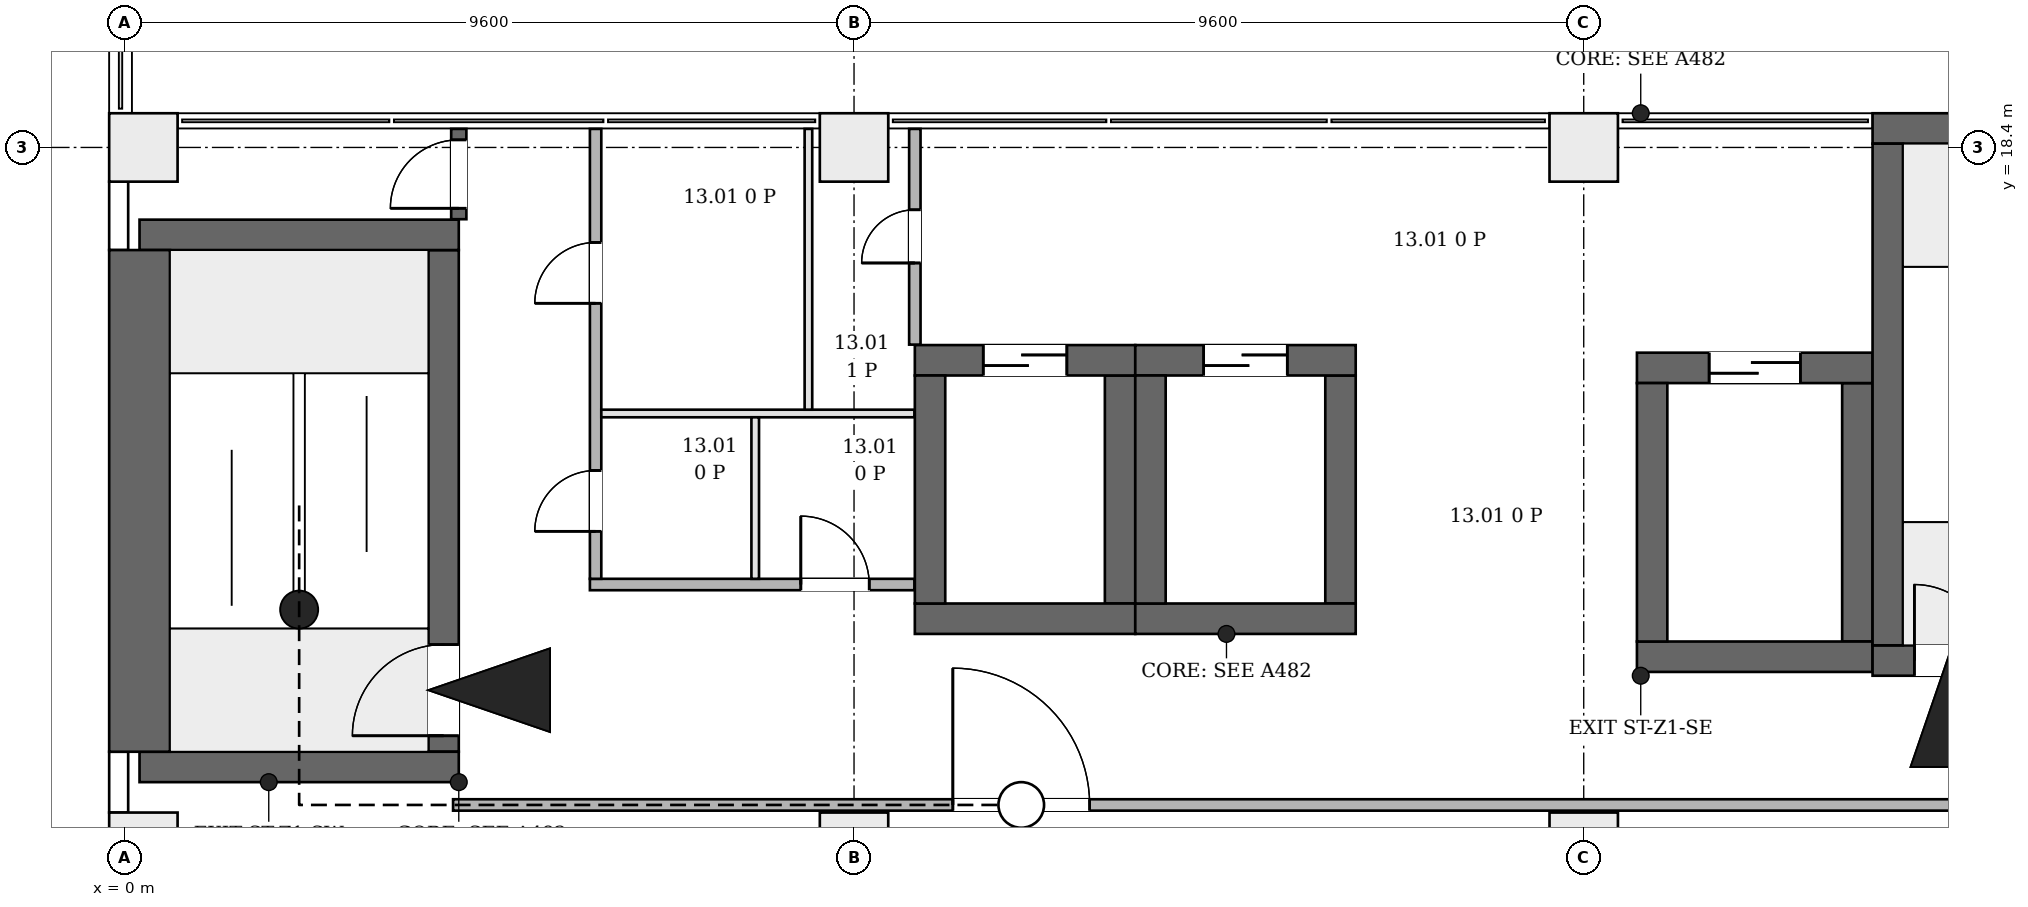
"""IFC4 building model, lengths in metres.
Left out: names, types, materials, properties, quantities, classifications, styles, units other than length and angle.
Written with IfcOpenShell. Run it as: python <this file> out.ifc"""

import sys

from ifc_helpers import new_model, si_unit, direction, frame, frame_2d, origin, origin_2d, place, context, subcontext, project, spatial, rectangle, extrude, element, fill, save


model = new_model("IFC4")
c1 = context("Model", 3, precision=1e-05, world=origin(), true_north=direction((0.0, 1.0)))
c2 = subcontext(c1, "Body", "Model", "MODEL_VIEW")
j1 = project(units=[si_unit("LENGTHUNIT", "METRE"), si_unit("PLANEANGLEUNIT", "RADIAN")], contexts=[c1])
p1 = place(None, origin())
s1 = spatial("IfcSite", under=j1, at=p1, CompositionType="ELEMENT")
p2 = place(p1, origin())
s2 = spatial("IfcBuilding", under=s1, at=p2, CompositionType="ELEMENT")
p3 = place(p2, frame((0.0, 0.0, 65.5)))
s3 = spatial("IfcBuildingStorey", under=s2, at=p3, CompositionType="ELEMENT", Elevation=65.5)
for number, where, z_axis, x_axis in (
    (1, (0.2, 10.25, 0.0), (0.0, 0.0, 1.0), (1.0, 0.0, 0.0)),
    (2, (0.2, 17.25, 0.0), (0.0, 0.0, 1.0), (1.0, 0.0, 0.0)),
):
    element("IfcWall", number, at=place(p3, frame(where, z_axis=z_axis, x_axis=x_axis)), inside=s3, PredefinedType="SHEAR", context=c2, shape_type="SweptSolid", body=[
        extrude(rectangle(XDim=4.2, YDim=0.4, at=frame_2d((2.1, 0.0))), origin(), (0.0, 0.0, 1.0), 4.2),
    ])
p4 = place(p3, frame((0.2, 10.45, 0.0), z_axis=(0.0, 0.0, 1.0), x_axis=(0.0, 1.0, 0.0)))
e3 = element("IfcWall", 3, at=p4, inside=s3, PredefinedType="SHEAR", context=c2, shape_type="SweptSolid", body=[
    extrude(rectangle(XDim=6.6, YDim=0.8, at=frame_2d((3.3, 0.0))), origin(), (0.0, 0.0, 1.0), 4.2),
])
p5 = place(p3, frame((4.2, 10.45, 0.0), z_axis=(0.0, 0.0, 1.0), x_axis=(0.0, 1.0, 0.0)))
e4 = element("IfcWall", 4, at=p5, inside=s3, PredefinedType="SHEAR", context=c2, shape_type="SweptSolid", body=[
    extrude(rectangle(XDim=6.6, YDim=0.4, at=frame_2d((3.3, 0.0))), origin(), (0.0, 0.0, 1.0), 4.2),
])
p6 = place(p5, frame((0.21, 0.0, 0.0)))
e5 = element("IfcOpeningElement", 5, at=p6, cuts=e4, PredefinedType="OPENING", context=c2, shape_type="SweptSolid", body=[
    extrude(rectangle(XDim=1.2, YDim=2.1, at=frame_2d((0.6, 1.05))), frame((0.0, 0.21, 0.0), z_axis=(0.0, -1.0, 0.0), x_axis=(1.0, 0.0, 0.0)), (0.0, 0.0, 1.0), 0.42),
])
p7 = place(p3, frame((23.0, 11.65, 0.0), z_axis=(0.0, 0.0, 1.0), x_axis=(1.0, 0.0, 0.0)))
e6 = element("IfcWall", 6, at=p7, inside=s3, PredefinedType="SHEAR", context=c2, shape_type="SweptSolid", body=[
    extrude(rectangle(XDim=4.2, YDim=0.4, at=frame_2d((2.1, 0.0))), origin(), (0.0, 0.0, 1.0), 4.2),
])
p8 = place(p7, frame((0.55, 0.0, 0.0)))
e7 = element("IfcOpeningElement", 7, at=p8, cuts=e6, PredefinedType="OPENING", context=c2, shape_type="SweptSolid", body=[
    extrude(rectangle(XDim=1.0, YDim=2.1, at=frame_2d((0.5, 1.05))), frame((0.0, 0.21, 0.0), z_axis=(0.0, -1.0, 0.0), x_axis=(1.0, 0.0, 0.0)), (0.0, 0.0, 1.0), 0.42),
])
p9 = place(p7, frame((2.65, 0.0, 0.0)))
e8 = element("IfcOpeningElement", 8, at=p9, cuts=e6, PredefinedType="OPENING", context=c2, shape_type="SweptSolid", body=[
    extrude(rectangle(XDim=1.0, YDim=2.1, at=frame_2d((0.5, 1.05))), frame((0.0, 0.21, 0.0), z_axis=(0.0, -1.0, 0.0), x_axis=(1.0, 0.0, 0.0)), (0.0, 0.0, 1.0), 0.42),
])
p10 = place(p3, frame((23.0, 18.65, 0.0), z_axis=(0.0, 0.0, 1.0), x_axis=(1.0, 0.0, 0.0)))
e9 = element("IfcWall", 9, at=p10, inside=s3, PredefinedType="SHEAR", context=c2, shape_type="SweptSolid", body=[
    extrude(rectangle(XDim=4.2, YDim=0.4, at=frame_2d((2.1, 0.0))), origin(), (0.0, 0.0, 1.0), 4.2),
])
p11 = place(p3, frame((23.2, 11.85, 0.0), z_axis=(0.0, 0.0, 1.0), x_axis=(0.0, 1.0, 0.0)))
e10 = element("IfcWall", 10, at=p11, inside=s3, PredefinedType="SHEAR", context=c2, shape_type="SweptSolid", body=[
    extrude(rectangle(XDim=6.6, YDim=0.4, at=frame_2d((3.3, 0.0))), origin(), (0.0, 0.0, 1.0), 4.2),
])
p12 = place(p3, frame((10.4, 12.2, 0.0), z_axis=(0.0, 0.0, 1.0), x_axis=(1.0, 0.0, 0.0)))
e11 = element("IfcWall", 11, at=p12, inside=s3, PredefinedType="SHEAR", context=c2, shape_type="SweptSolid", body=[
    extrude(rectangle(XDim=2.9, YDim=0.4, at=frame_2d((1.45, 0.0))), origin(), (0.0, 0.0, 1.0), 4.2),
])
p13 = place(p3, frame((10.4, 15.6, 0.0), z_axis=(0.0, 0.0, 1.0), x_axis=(1.0, 0.0, 0.0)))
e12 = element("IfcWall", 12, at=p13, inside=s3, PredefinedType="SHEAR", context=c2, shape_type="SweptSolid", body=[
    extrude(rectangle(XDim=2.9, YDim=0.4, at=frame_2d((1.45, 0.0))), origin(), (0.0, 0.0, 1.0), 4.2),
])
p14 = place(p13, frame((0.9, 0.0, 0.0)))
e13 = element("IfcOpeningElement", 13, at=p14, cuts=e12, PredefinedType="OPENING", context=c2, shape_type="SweptSolid", body=[
    extrude(rectangle(XDim=1.1, YDim=2.1, at=frame_2d((0.55, 1.05))), frame((0.0, 0.21, 0.0), z_axis=(0.0, -1.0, 0.0), x_axis=(1.0, 0.0, 0.0)), (0.0, 0.0, 1.0), 0.42),
])
for number, where, z_axis, x_axis in (
    (14, (10.6, 12.4, 0.0), (0.0, 0.0, 1.0), (0.0, 1.0, 0.0)),
    (15, (13.1, 12.4, 0.0), (0.0, 0.0, 1.0), (0.0, 1.0, 0.0)),
):
    element("IfcWall", number, at=place(p3, frame(where, z_axis=z_axis, x_axis=x_axis)), inside=s3, PredefinedType="SHEAR", context=c2, shape_type="SweptSolid", body=[
        extrude(rectangle(XDim=3.0, YDim=0.4, at=frame_2d((1.5, 0.0))), origin(), (0.0, 0.0, 1.0), 4.2),
    ])
p15 = place(p3, frame((13.3, 12.2, 0.0), z_axis=(0.0, 0.0, 1.0), x_axis=(1.0, 0.0, 0.0)))
e16 = element("IfcWall", 16, at=p15, inside=s3, PredefinedType="SHEAR", context=c2, shape_type="SweptSolid", body=[
    extrude(rectangle(XDim=2.9, YDim=0.4, at=frame_2d((1.45, 0.0))), origin(), (0.0, 0.0, 1.0), 4.2),
])
p16 = place(p3, frame((13.3, 15.6, 0.0), z_axis=(0.0, 0.0, 1.0), x_axis=(1.0, 0.0, 0.0)))
e17 = element("IfcWall", 17, at=p16, inside=s3, PredefinedType="SHEAR", context=c2, shape_type="SweptSolid", body=[
    extrude(rectangle(XDim=2.9, YDim=0.4, at=frame_2d((1.45, 0.0))), origin(), (0.0, 0.0, 1.0), 4.2),
])
p17 = place(p16, frame((0.9, 0.0, 0.0)))
e18 = element("IfcOpeningElement", 18, at=p17, cuts=e17, PredefinedType="OPENING", context=c2, shape_type="SweptSolid", body=[
    extrude(rectangle(XDim=1.1, YDim=2.1, at=frame_2d((0.55, 1.05))), frame((0.0, 0.21, 0.0), z_axis=(0.0, -1.0, 0.0), x_axis=(1.0, 0.0, 0.0)), (0.0, 0.0, 1.0), 0.42),
])
for number, where, z_axis, x_axis in (
    (19, (13.5, 12.4, 0.0), (0.0, 0.0, 1.0), (0.0, 1.0, 0.0)),
    (20, (16.0, 12.4, 0.0), (0.0, 0.0, 1.0), (0.0, 1.0, 0.0)),
):
    element("IfcWall", number, at=place(p3, frame(where, z_axis=z_axis, x_axis=x_axis)), inside=s3, PredefinedType="SHEAR", context=c2, shape_type="SweptSolid", body=[
        extrude(rectangle(XDim=3.0, YDim=0.4, at=frame_2d((1.5, 0.0))), origin(), (0.0, 0.0, 1.0), 4.2),
    ])
p18 = place(p3, frame((19.9, 11.7, 0.0), z_axis=(0.0, 0.0, 1.0), x_axis=(1.0, 0.0, 0.0)))
e21 = element("IfcWall", 21, at=p18, inside=s3, PredefinedType="SHEAR", context=c2, shape_type="SweptSolid", body=[
    extrude(rectangle(XDim=3.1, YDim=0.4, at=frame_2d((1.55, 0.0))), origin(), (0.0, 0.0, 1.0), 4.2),
])
p19 = place(p3, frame((19.9, 15.5, 0.0), z_axis=(0.0, 0.0, 1.0), x_axis=(1.0, 0.0, 0.0)))
e22 = element("IfcWall", 22, at=p19, inside=s3, PredefinedType="SHEAR", context=c2, shape_type="SweptSolid", body=[
    extrude(rectangle(XDim=3.1, YDim=0.4, at=frame_2d((1.55, 0.0))), origin(), (0.0, 0.0, 1.0), 4.2),
])
p20 = place(p19, frame((0.95, 0.0, 0.0)))
e23 = element("IfcOpeningElement", 23, at=p20, cuts=e22, PredefinedType="OPENING", context=c2, shape_type="SweptSolid", body=[
    extrude(rectangle(XDim=1.2, YDim=2.1, at=frame_2d((0.6, 1.05))), frame((0.0, 0.21, 0.0), z_axis=(0.0, -1.0, 0.0), x_axis=(1.0, 0.0, 0.0)), (0.0, 0.0, 1.0), 0.42),
])
for number, where, z_axis, x_axis in (
    (24, (20.1, 11.9, 0.0), (0.0, 0.0, 1.0), (0.0, 1.0, 0.0)),
    (25, (22.8, 11.9, 0.0), (0.0, 0.0, 1.0), (0.0, 1.0, 0.0)),
):
    element("IfcWall", number, at=place(p3, frame(where, z_axis=z_axis, x_axis=x_axis)), inside=s3, PredefinedType="SHEAR", context=c2, shape_type="SweptSolid", body=[
        extrude(rectangle(XDim=3.4, YDim=0.4, at=frame_2d((1.7, 0.0))), origin(), (0.0, 0.0, 1.0), 4.2),
    ])
for number, where, z_axis, x_axis in (
    (26, (0.25, 9.2, 0.0), (0.0, 0.0, 1.0), (1.0, 0.0, 0.0)),
    (27, (9.6, 9.2, 0.0), (0.0, 0.0, 1.0), (1.0, 0.0, 0.0)),
    (28, (19.2, 9.2, 0.0), (0.0, 0.0, 1.0), (1.0, 0.0, 0.0)),
    (29, (0.25, 18.4, 0.0), (0.0, 0.0, 1.0), (1.0, 0.0, 0.0)),
    (30, (9.6, 18.4, 0.0), (0.0, 0.0, 1.0), (1.0, 0.0, 0.0)),
    (31, (19.2, 18.4, 0.0), (0.0, 0.0, 1.0), (1.0, 0.0, 0.0)),
):
    element("IfcColumn", number, at=place(p3, frame(where, z_axis=z_axis, x_axis=x_axis)), inside=s3, PredefinedType="COLUMN", context=c2, shape_type="SweptSolid", body=[
        extrude(rectangle(XDim=0.9, YDim=0.9, at=origin_2d()), origin(), (0.0, 0.0, 1.0), 4.2),
    ])
p21 = place(p3, frame((-0.074, 10.45, 0.0), z_axis=(0.0, 0.0, 1.0), x_axis=(0.0, -1.0, 0.0)))
e32 = element("IfcWall", 32, at=p21, inside=s3, PredefinedType="ELEMENTEDWALL", context=c2, shape_type="SweptSolid", body=[
    extrude(rectangle(XDim=0.8, YDim=0.25, at=frame_2d((0.4, 0.0))), origin(), (0.0, 0.0, 1.0), 3.9),
])
p22 = place(p3, frame((-0.074, 17.95, 0.0), z_axis=(0.0, 0.0, 1.0), x_axis=(0.0, -1.0, 0.0)))
e33 = element("IfcWall", 33, at=p22, inside=s3, PredefinedType="ELEMENTEDWALL", context=c2, shape_type="SweptSolid", body=[
    extrude(rectangle(XDim=0.9, YDim=0.25, at=frame_2d((0.45, 0.0))), origin(), (0.0, 0.0, 1.0), 3.9),
])
p23 = place(p3, frame((4.4, 17.456, 0.0), z_axis=(0.0, 0.0, 1.0), x_axis=(0.0, 1.0, 0.0)))
e34 = element("IfcWall", 34, at=p23, inside=s3, PredefinedType="PARTITIONING", context=c2, shape_type="SweptSolid", body=[
    extrude(rectangle(XDim=1.188, YDim=0.2, at=frame_2d((0.594, 0.0))), origin(), (0.0, 0.0, 1.0), 3.9),
])
p24 = place(p23, frame((0.144, 0.0, 0.0)))
e35 = element("IfcOpeningElement", 35, at=p24, cuts=e34, PredefinedType="OPENING", context=c2, shape_type="SweptSolid", body=[
    extrude(rectangle(XDim=0.9, YDim=2.1, at=frame_2d((0.45, 1.05))), frame((0.0, 0.11, 0.0), z_axis=(0.0, -1.0, 0.0), x_axis=(1.0, 0.0, 0.0)), (0.0, 0.0, 1.0), 0.22),
])
p25 = place(p3, frame((4.325, 9.75, 0.0), z_axis=(0.0, 0.0, 1.0), x_axis=(1.0, 0.0, 0.0)))
e36 = element("IfcWall", 36, at=p25, inside=s3, PredefinedType="PARTITIONING", context=c2, shape_type="SweptSolid", body=[
    extrude(rectangle(XDim=43.869, YDim=0.15, at=frame_2d((21.935, 0.0))), origin(), (0.0, 0.0, 1.0), 3.9),
])
p26 = place(p25, frame((6.575, 0.0, 0.0)))
e37 = element("IfcOpeningElement", 37, at=p26, cuts=e36, PredefinedType="OPENING", context=c2, shape_type="SweptSolid", body=[
    extrude(rectangle(XDim=1.8, YDim=2.1, at=frame_2d((0.9, 1.05))), frame((0.0, 0.085, 0.0), z_axis=(0.0, -1.0, 0.0), x_axis=(1.0, 0.0, 0.0)), (0.0, 0.0, 1.0), 0.17),
])
p27 = place(p25, frame((21.175, 0.0, 0.0)))
e38 = element("IfcOpeningElement", 38, at=p27, cuts=e36, PredefinedType="OPENING", context=c2, shape_type="SweptSolid", body=[
    extrude(rectangle(XDim=1.8, YDim=2.1, at=frame_2d((0.9, 1.05))), frame((0.0, 0.085, 0.0), z_axis=(0.0, -1.0, 0.0), x_axis=(1.0, 0.0, 0.0)), (0.0, 0.0, 1.0), 0.17),
])
p28 = place(p25, frame((36.075, 0.0, 0.0)))
e39 = element("IfcOpeningElement", 39, at=p28, cuts=e36, PredefinedType="OPENING", context=c2, shape_type="SweptSolid", body=[
    extrude(rectangle(XDim=1.0, YDim=2.1, at=frame_2d((0.5, 1.05))), frame((0.0, 0.085, 0.0), z_axis=(0.0, -1.0, 0.0), x_axis=(1.0, 0.0, 0.0)), (0.0, 0.0, 1.0), 0.17),
])
p29 = place(p3, frame((6.125, 12.65, 0.0), z_axis=(0.0, 0.0, 1.0), x_axis=(1.0, 0.0, 0.0)))
e40 = element("IfcWall", 40, at=p29, inside=s3, PredefinedType="PARTITIONING", context=c2, shape_type="SweptSolid", body=[
    extrude(rectangle(XDim=4.269, YDim=0.15, at=frame_2d((2.135, 0.0))), origin(), (0.0, 0.0, 1.0), 3.9),
])
p30 = place(p29, frame((2.775, 0.0, 0.0)))
e41 = element("IfcOpeningElement", 41, at=p30, cuts=e40, PredefinedType="OPENING", context=c2, shape_type="SweptSolid", body=[
    extrude(rectangle(XDim=0.9, YDim=2.1, at=frame_2d((0.45, 1.05))), frame((0.0, 0.085, 0.0), z_axis=(0.0, -1.0, 0.0), x_axis=(1.0, 0.0, 0.0)), (0.0, 0.0, 1.0), 0.17),
])
p31 = place(p3, frame((6.2, 12.725, 0.0), z_axis=(0.0, 0.0, 1.0), x_axis=(0.0, 1.0, 0.0)))
e42 = element("IfcWall", 42, at=p31, inside=s3, PredefinedType="PARTITIONING", context=c2, shape_type="SweptSolid", body=[
    extrude(rectangle(XDim=5.919, YDim=0.15, at=frame_2d((2.959, 0.0))), origin(), (0.0, 0.0, 1.0), 3.9),
])
p32 = place(p31, frame((0.625, 0.0, 0.0)))
e43 = element("IfcOpeningElement", 43, at=p32, cuts=e42, PredefinedType="OPENING", context=c2, shape_type="SweptSolid", body=[
    extrude(rectangle(XDim=0.8, YDim=2.1, at=frame_2d((0.4, 1.05))), frame((0.0, 0.085, 0.0), z_axis=(0.0, -1.0, 0.0), x_axis=(1.0, 0.0, 0.0)), (0.0, 0.0, 1.0), 0.17),
])
p33 = place(p31, frame((3.625, 0.0, 0.0)))
e44 = element("IfcOpeningElement", 44, at=p33, cuts=e42, PredefinedType="OPENING", context=c2, shape_type="SweptSolid", body=[
    extrude(rectangle(XDim=0.8, YDim=2.1, at=frame_2d((0.4, 1.05))), frame((0.0, 0.085, 0.0), z_axis=(0.0, -1.0, 0.0), x_axis=(1.0, 0.0, 0.0)), (0.0, 0.0, 1.0), 0.17),
])
p34 = place(p3, frame((6.275, 14.9, 0.0), z_axis=(0.0, 0.0, 1.0), x_axis=(1.0, 0.0, 0.0)))
e45 = element("IfcWall", 45, at=p34, inside=s3, PredefinedType="PARTITIONING", context=c2, shape_type="SweptSolid", body=[
    extrude(rectangle(XDim=4.119, YDim=0.1, at=frame_2d((2.06, 0.0))), origin(), (0.0, 0.0, 1.0), 3.9),
])
p35 = place(p3, frame((8.3, 12.725, 0.0), z_axis=(0.0, 0.0, 1.0), x_axis=(0.0, 1.0, 0.0)))
e46 = element("IfcWall", 46, at=p35, inside=s3, PredefinedType="PARTITIONING", context=c2, shape_type="SweptSolid", body=[
    extrude(rectangle(XDim=2.125, YDim=0.1, at=frame_2d((1.062, 0.0))), origin(), (0.0, 0.0, 1.0), 3.9),
])
p36 = place(p3, frame((9.0, 14.95, 0.0), z_axis=(0.0, 0.0, 1.0), x_axis=(0.0, 1.0, 0.0)))
e47 = element("IfcWall", 47, at=p36, inside=s3, PredefinedType="PARTITIONING", context=c2, shape_type="SweptSolid", body=[
    extrude(rectangle(XDim=3.694, YDim=0.1, at=frame_2d((1.847, 0.0))), origin(), (0.0, 0.0, 1.0), 3.9),
])
p37 = place(p3, frame((10.4, 15.806, 0.0), z_axis=(0.0, 0.0, 1.0), x_axis=(0.0, 1.0, 0.0)))
e48 = element("IfcWall", 48, at=p37, inside=s3, PredefinedType="PARTITIONING", context=c2, shape_type="SweptSolid", body=[
    extrude(rectangle(XDim=2.838, YDim=0.15, at=frame_2d((1.419, 0.0))), origin(), (0.0, 0.0, 1.0), 3.9),
])
p38 = place(p37, frame((1.074, 0.0, 0.0)))
e49 = element("IfcOpeningElement", 49, at=p38, cuts=e48, PredefinedType="OPENING", context=c2, shape_type="SweptSolid", body=[
    extrude(rectangle(XDim=0.7, YDim=2.1, at=frame_2d((0.35, 1.05))), frame((0.0, 0.085, 0.0), z_axis=(0.0, -1.0, 0.0), x_axis=(1.0, 0.0, 0.0)), (0.0, 0.0, 1.0), 0.17),
])
p39 = place(p6, origin())
e50 = element("IfcDoor", 50, at=p39, inside=s3, OperationType="SINGLE_SWING_RIGHT", PredefinedType="DOOR", context=c2, shape_type="SweptSolid", body=[
    extrude(rectangle(XDim=1.2, YDim=2.1, at=frame_2d((0.6, 1.05))), frame((0.0, 0.025, 0.0), z_axis=(0.0, -1.0, 0.0), x_axis=(1.0, 0.0, 0.0)), (0.0, 0.0, 1.0), 0.05),
])
fill(e5, e50)
p40 = place(p8, origin())
e51 = element("IfcDoor", 51, at=p40, inside=s3, OperationType="SINGLE_SWING_RIGHT", PredefinedType="DOOR", context=c2, shape_type="SweptSolid", body=[
    extrude(rectangle(XDim=1.0, YDim=2.1, at=frame_2d((0.5, 1.05))), frame((0.0, 0.025, 0.0), z_axis=(0.0, -1.0, 0.0), x_axis=(1.0, 0.0, 0.0)), (0.0, 0.0, 1.0), 0.05),
])
fill(e7, e51)
p41 = place(p14, origin())
e52 = element("IfcDoor", 52, at=p41, inside=s3, OperationType="DOUBLE_DOOR_SLIDING", PredefinedType="DOOR", context=c2, shape_type="SweptSolid", body=[
    extrude(rectangle(XDim=1.1, YDim=2.1, at=frame_2d((0.55, 1.05))), frame((0.0, 0.025, 0.0), z_axis=(0.0, -1.0, 0.0), x_axis=(1.0, 0.0, 0.0)), (0.0, 0.0, 1.0), 0.05),
])
fill(e13, e52)
p42 = place(p17, origin())
e53 = element("IfcDoor", 53, at=p42, inside=s3, OperationType="DOUBLE_DOOR_SLIDING", PredefinedType="DOOR", context=c2, shape_type="SweptSolid", body=[
    extrude(rectangle(XDim=1.1, YDim=2.1, at=frame_2d((0.55, 1.05))), frame((0.0, 0.025, 0.0), z_axis=(0.0, -1.0, 0.0), x_axis=(1.0, 0.0, 0.0)), (0.0, 0.0, 1.0), 0.05),
])
fill(e18, e53)
p43 = place(p20, origin())
e54 = element("IfcDoor", 54, at=p43, inside=s3, OperationType="DOUBLE_DOOR_SLIDING", PredefinedType="DOOR", context=c2, shape_type="SweptSolid", body=[
    extrude(rectangle(XDim=1.2, YDim=2.1, at=frame_2d((0.6, 1.05))), frame((0.0, 0.025, 0.0), z_axis=(0.0, -1.0, 0.0), x_axis=(1.0, 0.0, 0.0)), (0.0, 0.0, 1.0), 0.05),
])
fill(e23, e54)
p44 = place(p24, origin())
e55 = element("IfcDoor", 55, at=p44, inside=s3, OperationType="SINGLE_SWING_LEFT", PredefinedType="DOOR", context=c2, shape_type="SweptSolid", body=[
    extrude(rectangle(XDim=0.9, YDim=2.1, at=frame_2d((0.45, 1.05))), frame((0.0, 0.025, 0.0), z_axis=(0.0, -1.0, 0.0), x_axis=(1.0, 0.0, 0.0)), (0.0, 0.0, 1.0), 0.05),
])
fill(e35, e55)
p45 = place(p32, origin())
e56 = element("IfcDoor", 56, at=p45, inside=s3, OperationType="SINGLE_SWING_LEFT", PredefinedType="DOOR", context=c2, shape_type="SweptSolid", body=[
    extrude(rectangle(XDim=0.8, YDim=2.1, at=frame_2d((0.4, 1.05))), frame((0.0, 0.025, 0.0), z_axis=(0.0, -1.0, 0.0), x_axis=(1.0, 0.0, 0.0)), (0.0, 0.0, 1.0), 0.05),
])
fill(e43, e56)
p46 = place(p30, origin())
e57 = element("IfcDoor", 57, at=p46, inside=s3, OperationType="SINGLE_SWING_RIGHT", PredefinedType="DOOR", context=c2, shape_type="SweptSolid", body=[
    extrude(rectangle(XDim=0.9, YDim=2.1, at=frame_2d((0.45, 1.05))), frame((0.0, 0.025, 0.0), z_axis=(0.0, -1.0, 0.0), x_axis=(1.0, 0.0, 0.0)), (0.0, 0.0, 1.0), 0.05),
])
fill(e41, e57)
p47 = place(p33, origin())
e58 = element("IfcDoor", 58, at=p47, inside=s3, OperationType="SINGLE_SWING_LEFT", PredefinedType="DOOR", context=c2, shape_type="SweptSolid", body=[
    extrude(rectangle(XDim=0.8, YDim=2.1, at=frame_2d((0.4, 1.05))), frame((0.0, 0.025, 0.0), z_axis=(0.0, -1.0, 0.0), x_axis=(1.0, 0.0, 0.0)), (0.0, 0.0, 1.0), 0.05),
])
fill(e44, e58)
p48 = place(p38, origin())
e59 = element("IfcDoor", 59, at=p48, inside=s3, OperationType="SINGLE_SWING_LEFT", PredefinedType="DOOR", context=c2, shape_type="SweptSolid", body=[
    extrude(rectangle(XDim=0.7, YDim=2.1, at=frame_2d((0.35, 1.05))), frame((0.0, 0.025, 0.0), z_axis=(0.0, -1.0, 0.0), x_axis=(1.0, 0.0, 0.0)), (0.0, 0.0, 1.0), 0.05),
])
fill(e49, e59)
p49 = place(p26, origin())
e60 = element("IfcDoor", 60, at=p49, inside=s3, OperationType="DOUBLE_DOOR_SINGLE_SWING", PredefinedType="DOOR", context=c2, shape_type="SweptSolid", body=[
    extrude(rectangle(XDim=1.8, YDim=2.1, at=frame_2d((0.9, 1.05))), frame((0.0, 0.025, 0.0), z_axis=(0.0, -1.0, 0.0), x_axis=(1.0, 0.0, 0.0)), (0.0, 0.0, 1.0), 0.05),
])
fill(e37, e60)
save(model, sys.argv[1])
